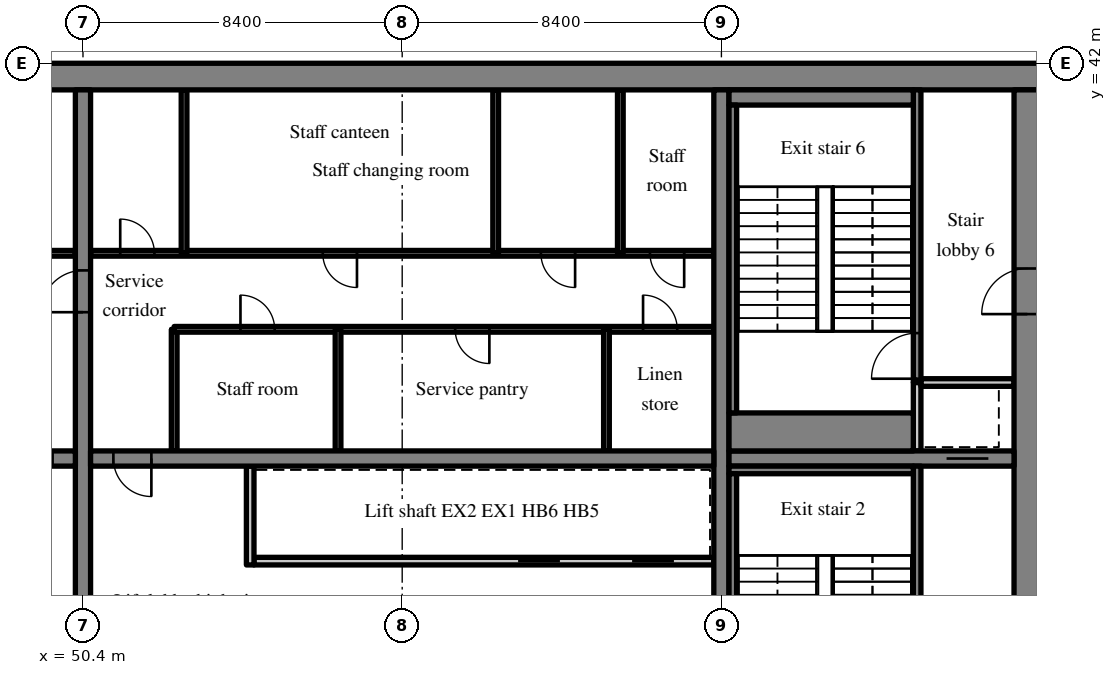
"""IFC4 building model, lengths in metres.
Left out: names, types, materials, properties, quantities, classifications, styles, units other than length and angle.
Written with IfcOpenShell. Run it as: python <this file> out.ifc"""

import sys

from ifc_helpers import new_model, si_unit, direction, frame, frame_2d, origin, place, context, subcontext, project, spatial, rectangle, extrude, source, transform, mapped, element, fill, save


model = new_model("IFC4")
c1 = context("Model", 3, precision=1e-05, world=origin(), true_north=direction((0.0, 1.0)))
c2 = subcontext(c1, "Body", "Model", "MODEL_VIEW")
j1 = project(units=[si_unit("LENGTHUNIT", "METRE"), si_unit("PLANEANGLEUNIT", "RADIAN")], contexts=[c1])
p1 = place(None, origin())
s1 = spatial("IfcSite", under=j1, at=p1, CompositionType="ELEMENT")
p2 = place(p1, origin())
s2 = spatial("IfcBuilding", under=s1, at=p2, CompositionType="ELEMENT")
p3 = place(p2, frame((0.0, 0.0, 163.0)))
s3 = spatial("IfcBuildingStorey", under=s2, at=p3, CompositionType="ELEMENT", Elevation=163.0)
m1 = source(origin(), c2, "Body", "SweptSolid", [
    extrude(rectangle(XDim=50.4, YDim=0.7, at=frame_2d((25.2, 0.0))), origin(), (0.0, 0.0, 1.0), 3.52),
])
p4 = place(p3, frame((25.2, 41.65, 0.0), z_axis=(0.0, 0.0, 1.0), x_axis=(1.0, 0.0, 0.0)))
e1 = element("IfcWall", 1, at=p4, inside=s3, PredefinedType="SHEAR", context=c2, shape_type="MappedRepresentation", body=[
    mapped(m1, transform((0.0, 0.0, 0.0), scale=1.0)),
])
m2 = source(origin(), c2, "Body", "SweptSolid", [
    extrude(rectangle(XDim=18.6, YDim=0.7, at=frame_2d((9.3, 0.0))), origin(), (0.0, 0.0, 1.0), 3.52),
])
p5 = place(p3, frame((75.25, 22.7, 0.0), z_axis=(0.0, 0.0, 1.0), x_axis=(0.0, 1.0, 0.0)))
e2 = element("IfcWall", 2, at=p5, inside=s3, PredefinedType="SHEAR", context=c2, shape_type="MappedRepresentation", body=[
    mapped(m2, transform((0.0, 0.0, 0.0), scale=1.0)),
])
m3 = source(origin(), c2, "Body", "SweptSolid", [
    extrude(rectangle(XDim=1.2, YDim=2.1, at=frame_2d((0.6, 1.05))), frame((0.0, 0.36, 0.0), z_axis=(0.0, -1.0, 0.0), x_axis=(1.0, 0.0, 0.0)), (0.0, 0.0, 1.0), 0.72),
])
p6 = place(p5, frame((12.7, 0.0, 0.0)))
e3 = element("IfcOpeningElement", 3, at=p6, cuts=e2, PredefinedType="OPENING", context=c2, shape_type="MappedRepresentation", body=[
    mapped(m3, transform((0.0, 0.0, 0.0), scale=1.0)),
])
m4 = source(origin(), c2, "Body", "SweptSolid", [
    extrude(rectangle(XDim=18.6, YDim=0.4, at=frame_2d((9.3, 0.0))), origin(), (0.0, 0.0, 1.0), 3.52),
])
p7 = place(p3, frame((50.4, 22.7, 0.0), z_axis=(0.0, 0.0, 1.0), x_axis=(0.0, 1.0, 0.0)))
e4 = element("IfcWall", 4, at=p7, inside=s3, PredefinedType="SHEAR", context=c2, shape_type="MappedRepresentation", body=[
    mapped(m4, transform((0.0, 0.0, 0.0), scale=1.0)),
])
m5 = source(origin(), c2, "Body", "SweptSolid", [
    extrude(rectangle(XDim=1.1, YDim=2.1, at=frame_2d((0.55, 1.05))), frame((0.0, 0.21, 0.0), z_axis=(0.0, -1.0, 0.0), x_axis=(1.0, 0.0, 0.0)), (0.0, 0.0, 1.0), 0.42),
])
p8 = place(p7, frame((12.75, 0.0, 0.0)))
e5 = element("IfcOpeningElement", 5, at=p8, cuts=e4, PredefinedType="OPENING", context=c2, shape_type="MappedRepresentation", body=[
    mapped(m5, transform((0.0, 0.0, 0.0), scale=1.0)),
])
p9 = place(p3, frame((67.2, 22.7, 0.0), z_axis=(0.0, 0.0, 1.0), x_axis=(0.0, 1.0, 0.0)))
e6 = element("IfcWall", 6, at=p9, inside=s3, PredefinedType="SHEAR", context=c2, shape_type="MappedRepresentation", body=[
    mapped(m4, transform((0.0, 0.0, 0.0), scale=1.0)),
])
m6 = source(origin(), c2, "Body", "SweptSolid", [
    extrude(rectangle(XDim=16.4, YDim=0.4, at=frame_2d((8.2, 0.0))), origin(), (0.0, 0.0, 1.0), 3.52),
])
p10 = place(p3, frame((33.8, 31.6, 0.0), z_axis=(0.0, 0.0, 1.0), x_axis=(1.0, 0.0, 0.0)))
e7 = element("IfcWall", 7, at=p10, inside=s3, PredefinedType="SHEAR", context=c2, shape_type="MappedRepresentation", body=[
    mapped(m6, transform((0.0, 0.0, 0.0), scale=1.0)),
])
m7 = source(origin(), c2, "Body", "SweptSolid", [
    extrude(rectangle(XDim=1.0, YDim=2.1, at=frame_2d((0.5, 1.05))), frame((0.0, 0.21, 0.0), z_axis=(0.0, -1.0, 0.0), x_axis=(1.0, 0.0, 0.0)), (0.0, 0.0, 1.0), 0.42),
])
p11 = place(p10, frame((14.8, 0.0, 0.0)))
e8 = element("IfcOpeningElement", 8, at=p11, cuts=e7, PredefinedType="OPENING", context=c2, shape_type="MappedRepresentation", body=[
    mapped(m7, transform((0.0, 0.0, 0.0), scale=1.0)),
])
p12 = place(p3, frame((50.6, 31.6, 0.0), z_axis=(0.0, 0.0, 1.0), x_axis=(1.0, 0.0, 0.0)))
e9 = element("IfcWall", 9, at=p12, inside=s3, PredefinedType="SHEAR", context=c2, shape_type="MappedRepresentation", body=[
    mapped(m6, transform((0.0, 0.0, 0.0), scale=1.0)),
])
p13 = place(p12, frame((0.6, 0.0, 0.0)))
e10 = element("IfcOpeningElement", 10, at=p13, cuts=e9, PredefinedType="OPENING", context=c2, shape_type="MappedRepresentation", body=[
    mapped(m7, transform((0.0, 0.0, 0.0), scale=1.0)),
])
m8 = source(origin(), c2, "Body", "SweptSolid", [
    extrude(rectangle(XDim=7.5, YDim=0.4, at=frame_2d((3.75, 0.0))), origin(), (0.0, 0.0, 1.0), 3.52),
])
p14 = place(p3, frame((67.4, 31.6, 0.0), z_axis=(0.0, 0.0, 1.0), x_axis=(1.0, 0.0, 0.0)))
e11 = element("IfcWall", 11, at=p14, inside=s3, PredefinedType="SHEAR", context=c2, shape_type="MappedRepresentation", body=[
    mapped(m8, transform((0.0, 0.0, 0.0), scale=1.0)),
])
p15 = place(p14, frame((5.725, 0.0, 0.0)))
e12 = element("IfcOpeningElement", 12, at=p15, cuts=e11, PredefinedType="OPENING", context=c2, shape_type="MappedRepresentation", body=[
    mapped(m5, transform((0.0, 0.0, 0.0), scale=1.0)),
])
m9 = source(origin(), c2, "Body", "SweptSolid", [
    extrude(rectangle(XDim=3.559, YDim=0.3, at=frame_2d((1.78, 0.0))), origin(), (0.0, 0.0, 1.0), 3.52),
])
p16 = place(p3, frame((76.523, 43.292, 0.0), z_axis=(0.0, 0.0, 1.0), x_axis=(-0.35779745313, -0.933799219604, 0.0)))
e13 = element("IfcWall", 13, at=p16, inside=s3, PredefinedType="SOLIDWALL", context=c2, shape_type="MappedRepresentation", body=[
    mapped(m9, transform((0.0, 0.0, 0.0), scale=1.0)),
])
m10 = source(origin(), c2, "Body", "SweptSolid", [
    extrude(rectangle(XDim=1.5, YDim=2.0, at=frame_2d((0.75, 1.0))), frame((0.0, 0.16, 0.0), z_axis=(0.0, -1.0, 0.0), x_axis=(1.0, 0.0, 0.0)), (0.0, 0.0, 1.0), 0.32),
])
p17 = place(p16, frame((0.156, 0.0, 0.9)))
e14 = element("IfcOpeningElement", 14, at=p17, cuts=e13, PredefinedType="OPENING", context=c2, shape_type="MappedRepresentation", body=[
    mapped(m10, transform((0.0, 0.0, 0.0), scale=1.0)),
])
m11 = source(origin(), c2, "Body", "SweptSolid", [
    extrude(rectangle(XDim=16.4, YDim=0.15, at=frame_2d((8.2, 0.0))), origin(), (0.0, 0.0, 1.0), 3.52),
])
p18 = place(p3, frame((33.8, 37.0, 0.0), z_axis=(0.0, 0.0, 1.0), x_axis=(1.0, 0.0, 0.0)))
e15 = element("IfcWall", 15, at=p18, inside=s3, PredefinedType="PARTITIONING", context=c2, shape_type="MappedRepresentation", body=[
    mapped(m11, transform((0.0, 0.0, 0.0), scale=1.0)),
])
m12 = source(origin(), c2, "Body", "SweptSolid", [
    extrude(rectangle(XDim=0.9, YDim=2.1, at=frame_2d((0.45, 1.05))), frame((0.0, 0.085, 0.0), z_axis=(0.0, -1.0, 0.0), x_axis=(1.0, 0.0, 0.0)), (0.0, 0.0, 1.0), 0.17),
])
p19 = place(p18, frame((3.24, 0.0, 0.0)))
e16 = element("IfcOpeningElement", 16, at=p19, cuts=e15, PredefinedType="OPENING", context=c2, shape_type="MappedRepresentation", body=[
    mapped(m12, transform((0.0, 0.0, 0.0), scale=1.0)),
])
p20 = place(p18, frame((8.16, 0.0, 0.0)))
e17 = element("IfcOpeningElement", 17, at=p20, cuts=e15, PredefinedType="OPENING", context=c2, shape_type="MappedRepresentation", body=[
    mapped(m12, transform((0.0, 0.0, 0.0), scale=1.0)),
])
p21 = place(p18, frame((11.44, 0.0, 0.0)))
e18 = element("IfcOpeningElement", 18, at=p21, cuts=e15, PredefinedType="OPENING", context=c2, shape_type="MappedRepresentation", body=[
    mapped(m12, transform((0.0, 0.0, 0.0), scale=1.0)),
])
p22 = place(p18, frame((14.72, 0.0, 0.0)))
e19 = element("IfcOpeningElement", 19, at=p22, cuts=e15, PredefinedType="OPENING", context=c2, shape_type="MappedRepresentation", body=[
    mapped(m12, transform((0.0, 0.0, 0.0), scale=1.0)),
])
m13 = source(origin(), c2, "Body", "SweptSolid", [
    extrude(rectangle(XDim=12.1, YDim=0.2, at=frame_2d((6.05, 0.0))), origin(), (0.0, 0.0, 1.0), 3.52),
])
p23 = place(p3, frame((67.0, 28.9, 0.0), z_axis=(0.0, 0.0, 1.0), x_axis=(-1.0, 0.0, 0.0)))
e20 = element("IfcWall", 20, at=p23, inside=s3, PredefinedType="SOLIDWALL", context=c2, shape_type="MappedRepresentation", body=[
    mapped(m13, transform((0.0, 0.0, 0.0), scale=1.0)),
])
m14 = source(origin(), c2, "Body", "SweptSolid", [
    extrude(rectangle(XDim=1.1, YDim=2.1, at=frame_2d((0.55, 1.05))), frame((0.0, 0.11, 0.0), z_axis=(0.0, -1.0, 0.0), x_axis=(1.0, 0.0, 0.0)), (0.0, 0.0, 1.0), 0.22),
])
p24 = place(p23, frame((1.05, 0.0, 0.0)))
e21 = element("IfcOpeningElement", 21, at=p24, cuts=e20, PredefinedType="OPENING", context=c2, shape_type="MappedRepresentation", body=[
    mapped(m14, transform((0.0, 0.0, 0.0), scale=1.0)),
])
p25 = place(p23, frame((4.05, 0.0, 0.0)))
e22 = element("IfcOpeningElement", 22, at=p25, cuts=e20, PredefinedType="OPENING", context=c2, shape_type="MappedRepresentation", body=[
    mapped(m14, transform((0.0, 0.0, 0.0), scale=1.0)),
])
m15 = source(origin(), c2, "Body", "SweptSolid", [
    extrude(rectangle(XDim=2.6, YDim=0.2, at=frame_2d((1.3, 0.0))), origin(), (0.0, 0.0, 1.0), 3.52),
])
p26 = place(p3, frame((54.8, 28.8, 0.0), z_axis=(0.0, 0.0, 1.0), x_axis=(0.0, 1.0, 0.0)))
e23 = element("IfcWall", 23, at=p26, inside=s3, PredefinedType="SOLIDWALL", context=c2, shape_type="MappedRepresentation", body=[
    mapped(m15, transform((0.0, 0.0, 0.0), scale=1.0)),
])
m16 = source(origin(), c2, "Body", "SweptSolid", [
    extrude(rectangle(XDim=3.2, YDim=0.15, at=frame_2d((1.6, 0.0))), origin(), (0.0, 0.0, 1.0), 3.52),
])
p27 = place(p3, frame((52.8, 31.8, 0.0), z_axis=(0.0, 0.0, 1.0), x_axis=(0.0, 1.0, 0.0)))
e24 = element("IfcWall", 24, at=p27, inside=s3, PredefinedType="PARTITIONING", context=c2, shape_type="MappedRepresentation", body=[
    mapped(m16, transform((0.0, 0.0, 0.0), scale=1.0)),
])
m17 = source(origin(), c2, "Body", "SweptSolid", [
    extrude(rectangle(XDim=14.2, YDim=0.15, at=frame_2d((7.1, 0.0))), origin(), (0.0, 0.0, 1.0), 3.52),
])
p28 = place(p3, frame((67.0, 35.0, 0.0), z_axis=(0.0, 0.0, 1.0), x_axis=(-1.0, 0.0, 0.0)))
e25 = element("IfcWall", 25, at=p28, inside=s3, PredefinedType="PARTITIONING", context=c2, shape_type="MappedRepresentation", body=[
    mapped(m17, transform((0.0, 0.0, 0.0), scale=1.0)),
])
p29 = place(p28, frame((0.962, 0.0, 0.0)))
e26 = element("IfcOpeningElement", 26, at=p29, cuts=e25, PredefinedType="OPENING", context=c2, shape_type="MappedRepresentation", body=[
    mapped(m12, transform((0.0, 0.0, 0.0), scale=1.0)),
])
p30 = place(p28, frame((5.906, 0.0, 0.0)))
e27 = element("IfcOpeningElement", 27, at=p30, cuts=e25, PredefinedType="OPENING", context=c2, shape_type="MappedRepresentation", body=[
    mapped(m12, transform((0.0, 0.0, 0.0), scale=1.0)),
])
p31 = place(p28, frame((11.556, 0.0, 0.0)))
e28 = element("IfcOpeningElement", 28, at=p31, cuts=e25, PredefinedType="OPENING", context=c2, shape_type="MappedRepresentation", body=[
    mapped(m12, transform((0.0, 0.0, 0.0), scale=1.0)),
])
p32 = place(p3, frame((67.0, 37.0, 0.0), z_axis=(0.0, 0.0, 1.0), x_axis=(-1.0, 0.0, 0.0)))
e29 = element("IfcWall", 29, at=p32, inside=s3, PredefinedType="PARTITIONING", context=c2, shape_type="MappedRepresentation", body=[
    mapped(m11, transform((0.0, 0.0, 0.0), scale=1.0)),
])
p33 = place(p32, frame((0.78, 0.0, 0.0)))
e30 = element("IfcOpeningElement", 30, at=p33, cuts=e29, PredefinedType="OPENING", context=c2, shape_type="MappedRepresentation", body=[
    mapped(m12, transform((0.0, 0.0, 0.0), scale=1.0)),
])
p34 = place(p32, frame((3.65, 0.0, 0.0)))
e31 = element("IfcOpeningElement", 31, at=p34, cuts=e29, PredefinedType="OPENING", context=c2, shape_type="MappedRepresentation", body=[
    mapped(m12, transform((0.0, 0.0, 0.0), scale=1.0)),
])
p35 = place(p32, frame((9.39, 0.0, 0.0)))
e32 = element("IfcOpeningElement", 32, at=p35, cuts=e29, PredefinedType="OPENING", context=c2, shape_type="MappedRepresentation", body=[
    mapped(m12, transform((0.0, 0.0, 0.0), scale=1.0)),
])
p36 = place(p32, frame((14.72, 0.0, 0.0)))
e33 = element("IfcOpeningElement", 33, at=p36, cuts=e29, PredefinedType="OPENING", context=c2, shape_type="MappedRepresentation", body=[
    mapped(m12, transform((0.0, 0.0, 0.0), scale=1.0)),
])
for number, where, z_axis, x_axis in (
    (34, (64.175, 31.8, 0.0), (0.0, 0.0, 1.0), (0.0, 1.0, 0.0)),
    (35, (57.112, 31.8, 0.0), (0.0, 0.0, 1.0), (0.0, 1.0, 0.0)),
):
    element("IfcWall", number, at=place(p3, frame(where, z_axis=z_axis, x_axis=x_axis)), inside=s3, PredefinedType="PARTITIONING", context=c2, shape_type="MappedRepresentation", body=[
        mapped(m16, transform((0.0, 0.0, 0.0), scale=1.0)),
    ])
m18 = source(origin(), c2, "Body", "SweptSolid", [
    extrude(rectangle(XDim=4.3, YDim=0.15, at=frame_2d((2.15, 0.0))), origin(), (0.0, 0.0, 1.0), 3.52),
])
for number, where, z_axis, x_axis in (
    (36, (64.54, 37.0, 0.0), (0.0, 0.0, 1.0), (0.0, 1.0, 0.0)),
    (37, (61.26, 37.0, 0.0), (0.0, 0.0, 1.0), (0.0, 1.0, 0.0)),
    (38, (53.06, 37.0, 0.0), (0.0, 0.0, 1.0), (0.0, 1.0, 0.0)),
):
    element("IfcWall", number, at=place(p3, frame(where, z_axis=z_axis, x_axis=x_axis)), inside=s3, PredefinedType="PARTITIONING", context=c2, shape_type="MappedRepresentation", body=[
        mapped(m18, transform((0.0, 0.0, 0.0), scale=1.0)),
    ])
m19 = source(origin(), c2, "Body", "SweptSolid", [
    extrude(rectangle(XDim=8.7, YDim=0.2, at=frame_2d((4.35, 0.0))), origin(), (0.0, 0.0, 1.0), 3.52),
])
p37 = place(p3, frame((72.35, 22.7, 0.0), z_axis=(0.0, 0.0, 1.0), x_axis=(0.0, 1.0, 0.0)))
e39 = element("IfcWall", 39, at=p37, inside=s3, PredefinedType="SOLIDWALL", context=c2, shape_type="MappedRepresentation", body=[
    mapped(m19, transform((0.0, 0.0, 0.0), scale=1.0)),
])
m20 = source(origin(), c2, "Body", "SweptSolid", [
    extrude(rectangle(XDim=1.2, YDim=2.1, at=frame_2d((0.6, 1.05))), frame((0.0, 0.11, 0.0), z_axis=(0.0, -1.0, 0.0), x_axis=(1.0, 0.0, 0.0)), (0.0, 0.0, 1.0), 0.22),
])
p38 = place(p37, frame((0.9, 0.0, 0.0)))
e40 = element("IfcOpeningElement", 40, at=p38, cuts=e39, PredefinedType="OPENING", context=c2, shape_type="MappedRepresentation", body=[
    mapped(m20, transform((0.0, 0.0, 0.0), scale=1.0)),
])
m21 = source(origin(), c2, "Body", "SweptSolid", [
    extrude(rectangle(XDim=1.8, YDim=0.2, at=frame_2d((0.9, 0.0))), origin(), (0.0, 0.0, 1.0), 3.52),
])
p39 = place(p3, frame((72.35, 31.8, 0.0), z_axis=(0.0, 0.0, 1.0), x_axis=(0.0, 1.0, 0.0)))
e41 = element("IfcWall", 41, at=p39, inside=s3, PredefinedType="SOLIDWALL", context=c2, shape_type="MappedRepresentation", body=[
    mapped(m21, transform((0.0, 0.0, 0.0), scale=1.0)),
])
m22 = source(origin(), c2, "Body", "SweptSolid", [
    extrude(rectangle(XDim=2.45, YDim=0.2, at=frame_2d((1.225, 0.0))), origin(), (0.0, 0.0, 1.0), 3.52),
])
p40 = place(p3, frame((72.45, 33.6, 0.0), z_axis=(0.0, 0.0, 1.0), x_axis=(1.0, 0.0, 0.0)))
e42 = element("IfcWall", 42, at=p40, inside=s3, PredefinedType="SOLIDWALL", context=c2, shape_type="MappedRepresentation", body=[
    mapped(m22, transform((0.0, 0.0, 0.0), scale=1.0)),
])
m23 = source(origin(), c2, "Body", "SweptSolid", [
    extrude(rectangle(XDim=7.7, YDim=0.2, at=frame_2d((3.85, 0.0))), origin(), (0.0, 0.0, 1.0), 3.52),
])
p41 = place(p3, frame((72.35, 33.6, 0.0), z_axis=(0.0, 0.0, 1.0), x_axis=(0.0, 1.0, 0.0)))
e43 = element("IfcWall", 43, at=p41, inside=s3, PredefinedType="SOLIDWALL", context=c2, shape_type="MappedRepresentation", body=[
    mapped(m23, transform((0.0, 0.0, 0.0), scale=1.0)),
])
p42 = place(p41, frame((0.1, 0.0, 0.0)))
e44 = element("IfcOpeningElement", 44, at=p42, cuts=e43, PredefinedType="OPENING", context=c2, shape_type="MappedRepresentation", body=[
    mapped(m20, transform((0.0, 0.0, 0.0), scale=1.0)),
])
m24 = source(origin(), c2, "Body", "SweptSolid", [
    extrude(rectangle(XDim=4.85, YDim=0.2, at=frame_2d((2.425, 0.0))), origin(), (0.0, 0.0, 1.0), 3.52),
])
p43 = place(p3, frame((67.4, 31.3, 0.0), z_axis=(0.0, 0.0, 1.0), x_axis=(1.0, 0.0, 0.0)))
e45 = element("IfcWall", 45, at=p43, inside=s3, PredefinedType="SOLIDWALL", context=c2, shape_type="MappedRepresentation", body=[
    mapped(m24, transform((0.0, 0.0, 0.0), scale=1.0)),
])
m25 = source(origin(), c2, "Body", "SweptSolid", [
    extrude(rectangle(XDim=8.1, YDim=0.2, at=frame_2d((4.05, 0.0))), origin(), (0.0, 0.0, 1.0), 3.52),
])
p44 = place(p3, frame((67.5, 23.1, 0.0), z_axis=(0.0, 0.0, 1.0), x_axis=(0.0, 1.0, 0.0)))
e46 = element("IfcWall", 46, at=p44, inside=s3, PredefinedType="SOLIDWALL", context=c2, shape_type="MappedRepresentation", body=[
    mapped(m25, transform((0.0, 0.0, 0.0), scale=1.0)),
])
m26 = source(origin(), c2, "Body", "SweptSolid", [
    extrude(rectangle(XDim=4.85, YDim=0.4, at=frame_2d((2.425, 0.0))), origin(), (0.0, 0.0, 1.0), 3.52),
])
p45 = place(p3, frame((67.4, 41.1, 0.0), z_axis=(0.0, 0.0, 1.0), x_axis=(1.0, 0.0, 0.0)))
e47 = element("IfcWall", 47, at=p45, inside=s3, PredefinedType="SOLIDWALL", context=c2, shape_type="MappedRepresentation", body=[
    mapped(m26, transform((0.0, 0.0, 0.0), scale=1.0)),
])
m27 = source(origin(), c2, "Body", "SweptSolid", [
    extrude(rectangle(XDim=4.85, YDim=1.0, at=frame_2d((2.425, 0.0))), origin(), (0.0, 0.0, 1.0), 3.52),
])
p46 = place(p3, frame((67.4, 32.3, 0.0), z_axis=(0.0, 0.0, 1.0), x_axis=(1.0, 0.0, 0.0)))
e48 = element("IfcWall", 48, at=p46, inside=s3, PredefinedType="SOLIDWALL", context=c2, shape_type="MappedRepresentation", body=[
    mapped(m27, transform((0.0, 0.0, 0.0), scale=1.0)),
])
p47 = place(p3, frame((67.5, 32.8, 0.0), z_axis=(0.0, 0.0, 1.0), x_axis=(0.0, 1.0, 0.0)))
e49 = element("IfcWall", 49, at=p47, inside=s3, PredefinedType="SOLIDWALL", context=c2, shape_type="MappedRepresentation", body=[
    mapped(m25, transform((0.0, 0.0, 0.0), scale=1.0)),
])
m28 = source(origin(), c2, "Body", "SweptSolid", [
    extrude(rectangle(XDim=1.0, YDim=2.1, at=frame_2d((0.5, 1.05))), frame((0.0, 0.025, 0.0), z_axis=(0.0, -1.0, 0.0), x_axis=(1.0, 0.0, 0.0)), (0.0, 0.0, 1.0), 0.05),
])
p48 = place(p13, origin())
e50 = element("IfcDoor", 50, at=p48, inside=s3, OperationType="SINGLE_SWING_RIGHT", PredefinedType="DOOR", context=c2, shape_type="MappedRepresentation", body=[
    mapped(m28, transform((0.0, 0.0, 0.0), scale=1.0)),
])
fill(e10, e50)
m29 = source(origin(), c2, "Body", "SweptSolid", [
    extrude(rectangle(XDim=1.1, YDim=2.1, at=frame_2d((0.55, 1.05))), frame((0.0, 0.025, 0.0), z_axis=(0.0, -1.0, 0.0), x_axis=(1.0, 0.0, 0.0)), (0.0, 0.0, 1.0), 0.05),
])
p49 = place(p24, origin())
e51 = element("IfcDoor", 51, at=p49, inside=s3, OperationType="SLIDING_TO_RIGHT", PredefinedType="DOOR", context=c2, shape_type="MappedRepresentation", body=[
    mapped(m29, transform((0.0, 0.0, 0.0), scale=1.0)),
])
fill(e21, e51)
p50 = place(p25, origin())
e52 = element("IfcDoor", 52, at=p50, inside=s3, OperationType="SLIDING_TO_LEFT", PredefinedType="DOOR", context=c2, shape_type="MappedRepresentation", body=[
    mapped(m29, transform((0.0, 0.0, 0.0), scale=1.0)),
])
fill(e22, e52)
m30 = source(origin(), c2, "Body", "SweptSolid", [
    extrude(rectangle(XDim=0.9, YDim=2.1, at=frame_2d((0.45, 1.05))), frame((0.0, 0.025, 0.0), z_axis=(0.0, -1.0, 0.0), x_axis=(1.0, 0.0, 0.0)), (0.0, 0.0, 1.0), 0.05),
])
p51 = place(p29, origin())
e53 = element("IfcDoor", 53, at=p51, inside=s3, OperationType="SINGLE_SWING_RIGHT", PredefinedType="DOOR", context=c2, shape_type="MappedRepresentation", body=[
    mapped(m30, transform((0.0, 0.0, 0.0), scale=1.0)),
])
fill(e26, e53)
p52 = place(p30, origin())
e54 = element("IfcDoor", 54, at=p52, inside=s3, OperationType="SINGLE_SWING_LEFT", PredefinedType="DOOR", context=c2, shape_type="MappedRepresentation", body=[
    mapped(m30, transform((0.0, 0.0, 0.0), scale=1.0)),
])
fill(e27, e54)
p53 = place(p31, origin())
e55 = element("IfcDoor", 55, at=p53, inside=s3, OperationType="SINGLE_SWING_RIGHT", PredefinedType="DOOR", context=c2, shape_type="MappedRepresentation", body=[
    mapped(m30, transform((0.0, 0.0, 0.0), scale=1.0)),
])
fill(e28, e55)
p54 = place(p33, origin())
e56 = element("IfcDoor", 56, at=p54, inside=s3, OperationType="SINGLE_SWING_LEFT", PredefinedType="DOOR", context=c2, shape_type="MappedRepresentation", body=[
    mapped(m30, transform((0.0, 0.0, 0.0), scale=1.0)),
])
fill(e30, e56)
p55 = place(p34, origin())
e57 = element("IfcDoor", 57, at=p55, inside=s3, OperationType="SINGLE_SWING_LEFT", PredefinedType="DOOR", context=c2, shape_type="MappedRepresentation", body=[
    mapped(m30, transform((0.0, 0.0, 0.0), scale=1.0)),
])
fill(e31, e57)
p56 = place(p35, origin())
e58 = element("IfcDoor", 58, at=p56, inside=s3, OperationType="SINGLE_SWING_LEFT", PredefinedType="DOOR", context=c2, shape_type="MappedRepresentation", body=[
    mapped(m30, transform((0.0, 0.0, 0.0), scale=1.0)),
])
fill(e32, e58)
p57 = place(p36, origin())
e59 = element("IfcDoor", 59, at=p57, inside=s3, OperationType="SINGLE_SWING_RIGHT", PredefinedType="DOOR", context=c2, shape_type="MappedRepresentation", body=[
    mapped(m30, transform((0.0, 0.0, 0.0), scale=1.0)),
])
fill(e33, e59)
p58 = place(p15, origin())
e60 = element("IfcDoor", 60, at=p58, inside=s3, OperationType="SLIDING_TO_LEFT", PredefinedType="DOOR", context=c2, shape_type="MappedRepresentation", body=[
    mapped(m29, transform((0.0, 0.0, 0.0), scale=1.0)),
])
fill(e12, e60)
m31 = source(origin(), c2, "Body", "SweptSolid", [
    extrude(rectangle(XDim=1.2, YDim=2.1, at=frame_2d((0.6, 1.05))), frame((0.0, 0.025, 0.0), z_axis=(0.0, -1.0, 0.0), x_axis=(1.0, 0.0, 0.0)), (0.0, 0.0, 1.0), 0.05),
])
p59 = place(p42, origin())
e61 = element("IfcDoor", 61, at=p59, inside=s3, OperationType="SINGLE_SWING_LEFT", PredefinedType="DOOR", context=c2, shape_type="MappedRepresentation", body=[
    mapped(m31, transform((0.0, 0.0, 0.0), scale=1.0)),
])
fill(e44, e61)
p60 = place(p6, origin())
e62 = element("IfcDoor", 62, at=p60, inside=s3, OperationType="SINGLE_SWING_LEFT", PredefinedType="DOOR", context=c2, shape_type="MappedRepresentation", body=[
    mapped(m31, transform((0.0, 0.0, 0.0), scale=1.0)),
])
fill(e3, e62)
p61 = place(p8, origin())
e63 = element("IfcDoor", 63, at=p61, inside=s3, OperationType="SINGLE_SWING_LEFT", PredefinedType="DOOR", context=c2, shape_type="MappedRepresentation", body=[
    mapped(m29, transform((0.0, 0.0, 0.0), scale=1.0)),
])
fill(e5, e63)
save(model, sys.argv[1])
